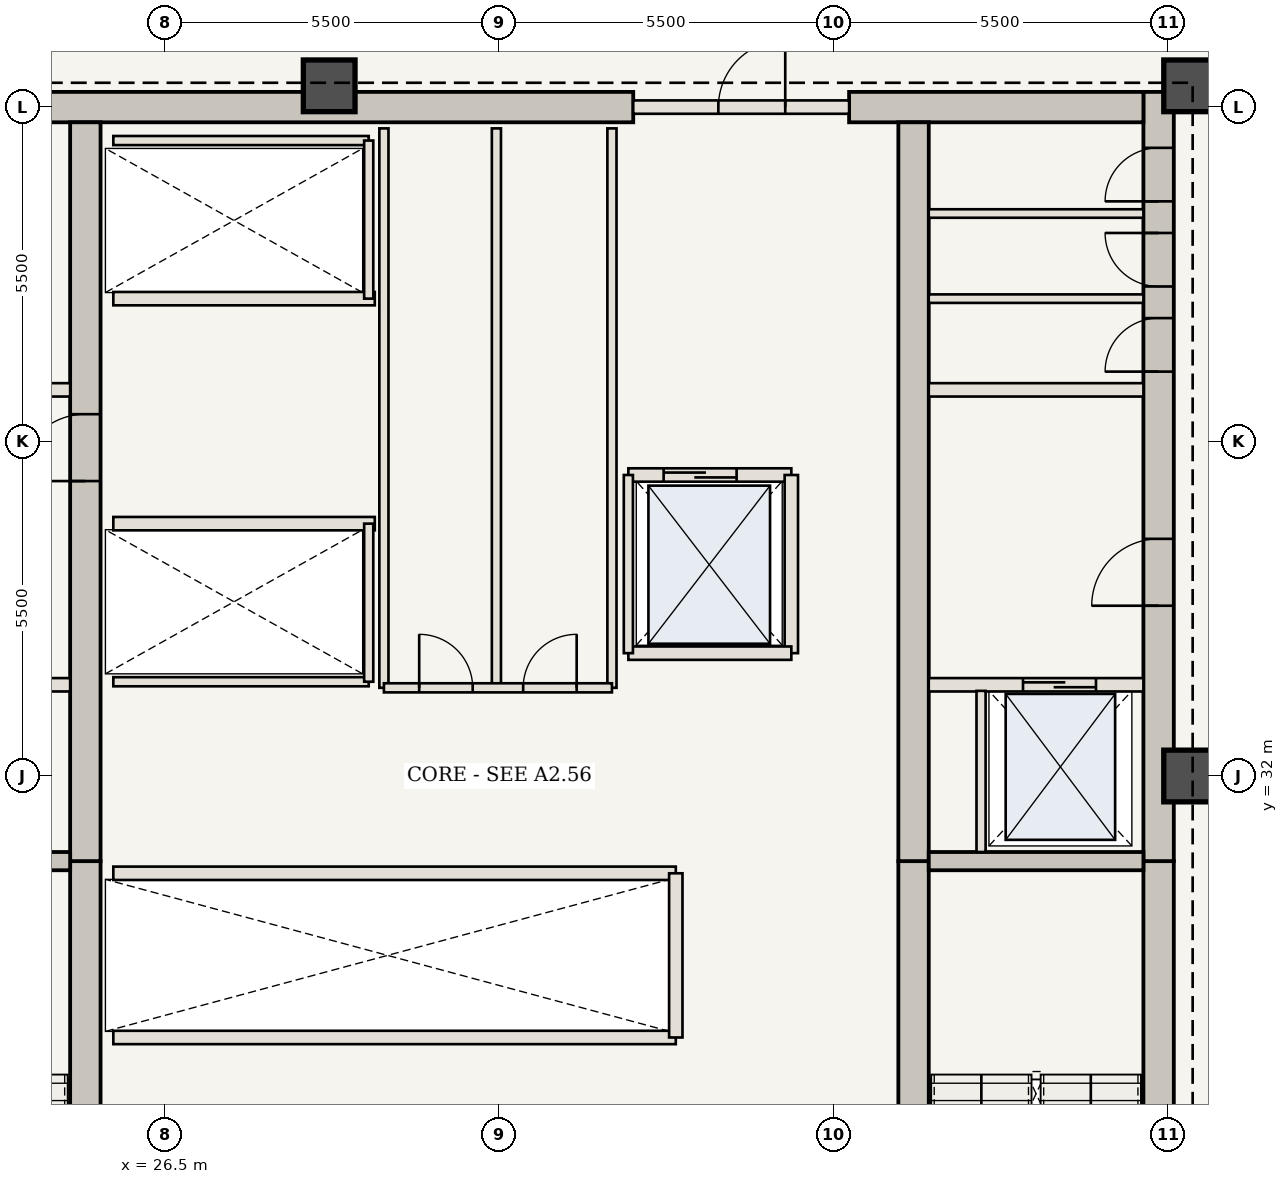
"""IFC4 building model, lengths in metres.
Left out: names, types, materials, properties, quantities, classifications, styles, units other than length and angle.
Written with IfcOpenShell. Run it as: python <this file> out.ifc"""

import sys

from ifc_helpers import new_model, si_unit, direction, frame, frame_2d, origin, origin_2d, place, context, subcontext, project, spatial, rectangle, extrude, element, fill, save


model = new_model("IFC4")
c1 = context("Model", 3, precision=1e-05, world=origin(), true_north=direction((0.0, 1.0)))
c2 = subcontext(c1, "Body", "Model", "MODEL_VIEW")
j1 = project(units=[si_unit("LENGTHUNIT", "METRE"), si_unit("PLANEANGLEUNIT", "RADIAN")], contexts=[c1])
p1 = place(None, origin())
s1 = spatial("IfcSite", under=j1, at=p1, CompositionType="ELEMENT")
p2 = place(p1, origin())
s2 = spatial("IfcBuilding", under=s1, at=p2, CompositionType="ELEMENT")
p3 = place(p2, frame((0.0, 0.0, 252.35)))
s3 = spatial("IfcBuildingStorey", under=s2, at=p3, CompositionType="ELEMENT", Elevation=252.35)
p4 = place(p3, frame((42.84, 20.7, 0.0), z_axis=(0.0, 0.0, 1.0), x_axis=(0.0, 1.0, 0.0)))
e1 = element("IfcWall", 1, at=p4, inside=s3, PredefinedType="SHEAR", context=c2, shape_type="SweptSolid", body=[
    extrude(rectangle(XDim=9.9, YDim=0.5, at=frame_2d((4.95, 0.0))), origin(), (0.0, 0.0, 1.0), 5.25),
])
p5 = place(p4, frame((1.05, 0.0, 0.0)))
e2 = element("IfcOpeningElement", 2, at=p5, cuts=e1, PredefinedType="OPENING", context=c2, shape_type="SweptSolid", body=[
    extrude(rectangle(XDim=1.15, YDim=2.15, at=frame_2d((0.575, 1.075))), frame((0.0, 0.26, 0.0), z_axis=(0.0, -1.0, 0.0), x_axis=(1.0, 0.0, 0.0)), (0.0, 0.0, 1.0), 0.52),
])
p6 = place(p3, frame((42.84, 30.6, 0.0), z_axis=(0.0, 0.0, 1.0), x_axis=(0.0, 1.0, 0.0)))
e3 = element("IfcWall", 3, at=p6, inside=s3, PredefinedType="SHEAR", context=c2, shape_type="SweptSolid", body=[
    extrude(rectangle(XDim=12.65, YDim=0.5, at=frame_2d((6.325, 0.0))), origin(), (0.0, 0.0, 1.0), 5.25),
])
p7 = place(p6, frame((4.2, 0.0, 0.0)))
e4 = element("IfcOpeningElement", 4, at=p7, cuts=e3, PredefinedType="OPENING", context=c2, shape_type="SweptSolid", body=[
    extrude(rectangle(XDim=1.1, YDim=2.15, at=frame_2d((0.55, 1.075))), frame((0.0, 0.26, 0.0), z_axis=(0.0, -1.0, 0.0), x_axis=(1.0, 0.0, 0.0)), (0.0, 0.0, 1.0), 0.52),
])
p8 = place(p6, frame((8.05, 0.0, 0.0)))
e5 = element("IfcOpeningElement", 5, at=p8, cuts=e3, PredefinedType="OPENING", context=c2, shape_type="SweptSolid", body=[
    extrude(rectangle(XDim=0.88, YDim=2.1, at=frame_2d((0.44, 1.05))), frame((0.0, 0.26, 0.0), z_axis=(0.0, -1.0, 0.0), x_axis=(1.0, 0.0, 0.0)), (0.0, 0.0, 1.0), 0.52),
])
p9 = place(p6, frame((9.45, 0.0, 0.0)))
e6 = element("IfcOpeningElement", 6, at=p9, cuts=e3, PredefinedType="OPENING", context=c2, shape_type="SweptSolid", body=[
    extrude(rectangle(XDim=0.88, YDim=2.1, at=frame_2d((0.44, 1.05))), frame((0.0, 0.26, 0.0), z_axis=(0.0, -1.0, 0.0), x_axis=(1.0, 0.0, 0.0)), (0.0, 0.0, 1.0), 0.52),
])
p10 = place(p6, frame((10.85, 0.0, 0.0)))
e7 = element("IfcOpeningElement", 7, at=p10, cuts=e3, PredefinedType="OPENING", context=c2, shape_type="SweptSolid", body=[
    extrude(rectangle(XDim=0.88, YDim=2.1, at=frame_2d((0.44, 1.05))), frame((0.0, 0.26, 0.0), z_axis=(0.0, -1.0, 0.0), x_axis=(1.0, 0.0, 0.0)), (0.0, 0.0, 1.0), 0.52),
])
p11 = place(p3, frame((21.41, 43.0, 0.0), z_axis=(0.0, 0.0, 1.0), x_axis=(1.0, 0.0, 0.0)))
e8 = element("IfcWall", 8, at=p11, inside=s3, PredefinedType="SHEAR", context=c2, shape_type="SweptSolid", body=[
    extrude(rectangle(XDim=12.79, YDim=0.5, at=frame_2d((6.395, 0.0))), origin(), (0.0, 0.0, 1.0), 5.25),
])
p12 = place(p3, frame((37.75, 43.0, 0.0), z_axis=(0.0, 0.0, 1.0), x_axis=(1.0, 0.0, 0.0)))
e9 = element("IfcWall", 9, at=p12, inside=s3, PredefinedType="SHEAR", context=c2, shape_type="SweptSolid", body=[
    extrude(rectangle(XDim=4.84, YDim=0.5, at=frame_2d((2.42, 0.0))), origin(), (0.0, 0.0, 1.0), 5.25),
])
p13 = place(p3, frame((25.19, 21.2, 0.0), z_axis=(0.0, 0.0, 1.0), x_axis=(0.0, 1.0, 0.0)))
e10 = element("IfcWall", 10, at=p13, inside=s3, PredefinedType="SHEAR", context=c2, shape_type="SweptSolid", body=[
    extrude(rectangle(XDim=9.4, YDim=0.5, at=frame_2d((4.7, 0.0))), origin(), (0.0, 0.0, 1.0), 5.25),
])
p14 = place(p3, frame((25.19, 30.6, 0.0), z_axis=(0.0, 0.0, 1.0), x_axis=(0.0, 1.0, 0.0)))
e11 = element("IfcWall", 11, at=p14, inside=s3, PredefinedType="SHEAR", context=c2, shape_type="SweptSolid", body=[
    extrude(rectangle(XDim=12.15, YDim=0.5, at=frame_2d((6.075, 0.0))), origin(), (0.0, 0.0, 1.0), 5.25),
])
p15 = place(p14, frame((6.25, 0.0, 0.0)))
e12 = element("IfcOpeningElement", 12, at=p15, cuts=e11, PredefinedType="OPENING", context=c2, shape_type="SweptSolid", body=[
    extrude(rectangle(XDim=1.1, YDim=2.15, at=frame_2d((0.55, 1.075))), frame((0.0, 0.26, 0.0), z_axis=(0.0, -1.0, 0.0), x_axis=(1.0, 0.0, 0.0)), (0.0, 0.0, 1.0), 0.52),
])
p16 = place(p3, frame((38.81, 21.2, 0.0), z_axis=(0.0, 0.0, 1.0), x_axis=(0.0, 1.0, 0.0)))
e13 = element("IfcWall", 13, at=p16, inside=s3, PredefinedType="SHEAR", context=c2, shape_type="SweptSolid", body=[
    extrude(rectangle(XDim=9.4, YDim=0.5, at=frame_2d((4.7, 0.0))), origin(), (0.0, 0.0, 1.0), 5.25),
])
p17 = place(p3, frame((38.81, 30.6, 0.0), z_axis=(0.0, 0.0, 1.0), x_axis=(0.0, 1.0, 0.0)))
e14 = element("IfcWall", 14, at=p17, inside=s3, PredefinedType="SHEAR", context=c2, shape_type="SweptSolid", body=[
    extrude(rectangle(XDim=12.15, YDim=0.5, at=frame_2d((6.075, 0.0))), origin(), (0.0, 0.0, 1.0), 5.25),
])
for number, where, z_axis, x_axis in (
    (15, (43.35, 32.0, 0.0), (0.0, 0.0, 1.0), (1.0, 0.0, 0.0)),
    (16, (43.35, 43.35, 0.0), (0.0, 0.0, 1.0), (1.0, 0.0, 0.0)),
    (17, (29.2, 43.35, 0.0), (0.0, 0.0, 1.0), (1.0, 0.0, 0.0)),
):
    element("IfcColumn", number, at=place(p3, frame(where, z_axis=z_axis, x_axis=x_axis)), inside=s3, PredefinedType="COLUMN", context=c2, shape_type="SweptSolid", body=[
        extrude(rectangle(XDim=0.85, YDim=0.85, at=origin_2d()), origin(), (0.0, 0.0, 1.0), 4.83),
    ])
for number, where, z_axis, x_axis in (
    (18, (21.41, 30.6, 0.0), (0.0, 0.0, 1.0), (1.0, 0.0, 0.0)),
    (19, (39.06, 30.6, 0.0), (0.0, 0.0, 1.0), (1.0, 0.0, 0.0)),
):
    element("IfcWall", number, at=place(p3, frame(where, z_axis=z_axis, x_axis=x_axis)), inside=s3, PredefinedType="SHEAR", context=c2, shape_type="SweptSolid", body=[
        extrude(rectangle(XDim=3.53, YDim=0.3, at=frame_2d((1.765, 0.0))), origin(), (0.0, 0.0, 1.0), 4.83),
    ])
p18 = place(p3, frame((21.41, 33.5, 0.0), z_axis=(0.0, 0.0, 1.0), x_axis=(1.0, 0.0, 0.0)))
e20 = element("IfcWall", 20, at=p18, inside=s3, PredefinedType="STANDARD", context=c2, shape_type="SweptSolid", body=[
    extrude(rectangle(XDim=3.53, YDim=0.22, at=frame_2d((1.765, 0.0))), origin(), (0.0, 0.0, 1.0), 4.83),
])
p19 = place(p18, frame((0.75, 0.0, 0.0)))
e21 = element("IfcOpeningElement", 21, at=p19, cuts=e20, PredefinedType="OPENING", context=c2, shape_type="SweptSolid", body=[
    extrude(rectangle(XDim=1.2, YDim=2.2, at=frame_2d((0.6, 1.1))), frame((0.0, 0.12, 0.0), z_axis=(0.0, -1.0, 0.0), x_axis=(1.0, 0.0, 0.0)), (0.0, 0.0, 1.0), 0.24),
])
p20 = place(p3, frame((39.06, 33.5, 0.0), z_axis=(0.0, 0.0, 1.0), x_axis=(1.0, 0.0, 0.0)))
e22 = element("IfcWall", 22, at=p20, inside=s3, PredefinedType="STANDARD", context=c2, shape_type="SweptSolid", body=[
    extrude(rectangle(XDim=3.53, YDim=0.22, at=frame_2d((1.765, 0.0))), origin(), (0.0, 0.0, 1.0), 4.83),
])
p21 = place(p20, frame((1.55, 0.0, 0.0)))
e23 = element("IfcOpeningElement", 23, at=p21, cuts=e22, PredefinedType="OPENING", context=c2, shape_type="SweptSolid", body=[
    extrude(rectangle(XDim=1.2, YDim=2.2, at=frame_2d((0.6, 1.1))), frame((0.0, 0.12, 0.0), z_axis=(0.0, -1.0, 0.0), x_axis=(1.0, 0.0, 0.0)), (0.0, 0.0, 1.0), 0.24),
])
p22 = place(p3, frame((39.92, 30.75, 0.0), z_axis=(0.0, 0.0, 1.0), x_axis=(0.0, 1.0, 0.0)))
e24 = element("IfcWall", 24, at=p22, inside=s3, PredefinedType="STANDARD", context=c2, shape_type="SweptSolid", body=[
    extrude(rectangle(XDim=2.65, YDim=0.15, at=frame_2d((1.325, 0.0))), origin(), (0.0, 0.0, 1.0), 4.83),
])
for number, where, z_axis, x_axis in (
    (25, (21.41, 38.35, 0.0), (0.0, 0.0, 1.0), (1.0, 0.0, 0.0)),
    (26, (39.06, 38.35, 0.0), (0.0, 0.0, 1.0), (1.0, 0.0, 0.0)),
):
    element("IfcWall", number, at=place(p3, frame(where, z_axis=z_axis, x_axis=x_axis)), inside=s3, PredefinedType="STANDARD", context=c2, shape_type="SweptSolid", body=[
        extrude(rectangle(XDim=3.53, YDim=0.22, at=frame_2d((1.765, 0.0))), origin(), (0.0, 0.0, 1.0), 4.83),
    ])
for number, where, z_axis, x_axis in (
    (27, (39.06, 39.85, 0.0), (0.0, 0.0, 1.0), (1.0, 0.0, 0.0)),
    (28, (39.06, 41.25, 0.0), (0.0, 0.0, 1.0), (1.0, 0.0, 0.0)),
):
    element("IfcWall", number, at=place(p3, frame(where, z_axis=z_axis, x_axis=x_axis)), inside=s3, PredefinedType="STANDARD", context=c2, shape_type="SweptSolid", body=[
        extrude(rectangle(XDim=3.53, YDim=0.14, at=frame_2d((1.765, 0.0))), origin(), (0.0, 0.0, 1.0), 4.83),
    ])
for number, where, z_axis, x_axis in (
    (29, (25.65, 27.7, 0.0), (0.0, 0.0, 1.0), (1.0, 0.0, 0.0)),
    (30, (25.65, 30.4, 0.0), (0.0, 0.0, 1.0), (1.0, 0.0, 0.0)),
):
    element("IfcWall", number, at=place(p3, frame(where, z_axis=z_axis, x_axis=x_axis)), inside=s3, PredefinedType="STANDARD", context=c2, shape_type="SweptSolid", body=[
        extrude(rectangle(XDim=9.25, YDim=0.22, at=frame_2d((4.625, 0.0))), origin(), (0.0, 0.0, 1.0), 4.83),
    ])
p23 = place(p3, frame((34.9, 27.7, 0.0), z_axis=(0.0, 0.0, 1.0), x_axis=(0.0, 1.0, 0.0)))
e31 = element("IfcWall", 31, at=p23, inside=s3, PredefinedType="STANDARD", context=c2, shape_type="SweptSolid", body=[
    extrude(rectangle(XDim=2.7, YDim=0.22, at=frame_2d((1.35, 0.0))), origin(), (0.0, 0.0, 1.0), 4.83),
])
p24 = place(p3, frame((25.65, 36.15, 0.0), z_axis=(0.0, 0.0, 1.0), x_axis=(1.0, 0.0, 0.0)))
e32 = element("IfcWall", 32, at=p24, inside=s3, PredefinedType="STANDARD", context=c2, shape_type="SweptSolid", body=[
    extrude(rectangle(XDim=4.3, YDim=0.22, at=frame_2d((2.15, 0.0))), origin(), (0.0, 0.0, 1.0), 4.83),
])
p25 = place(p3, frame((25.65, 33.55, 0.0), z_axis=(0.0, 0.0, 1.0), x_axis=(1.0, 0.0, 0.0)))
e33 = element("IfcWall", 33, at=p25, inside=s3, PredefinedType="STANDARD", context=c2, shape_type="SweptSolid", body=[
    extrude(rectangle(XDim=4.2, YDim=0.15, at=frame_2d((2.1, 0.0))), origin(), (0.0, 0.0, 1.0), 4.83),
])
p26 = place(p3, frame((29.85, 33.55, 0.0), z_axis=(0.0, 0.0, 1.0), x_axis=(0.0, 1.0, 0.0)))
e34 = element("IfcWall", 34, at=p26, inside=s3, PredefinedType="STANDARD", context=c2, shape_type="SweptSolid", body=[
    extrude(rectangle(XDim=2.6, YDim=0.15, at=frame_2d((1.3, 0.0))), origin(), (0.0, 0.0, 1.0), 4.83),
])
p27 = place(p3, frame((25.65, 39.85, 0.0), z_axis=(0.0, 0.0, 1.0), x_axis=(1.0, 0.0, 0.0)))
e35 = element("IfcWall", 35, at=p27, inside=s3, PredefinedType="STANDARD", context=c2, shape_type="SweptSolid", body=[
    extrude(rectangle(XDim=4.3, YDim=0.22, at=frame_2d((2.15, 0.0))), origin(), (0.0, 0.0, 1.0), 4.83),
])
p28 = place(p3, frame((25.65, 42.45, 0.0), z_axis=(0.0, 0.0, 1.0), x_axis=(1.0, 0.0, 0.0)))
e36 = element("IfcWall", 36, at=p28, inside=s3, PredefinedType="STANDARD", context=c2, shape_type="SweptSolid", body=[
    extrude(rectangle(XDim=4.2, YDim=0.15, at=frame_2d((2.1, 0.0))), origin(), (0.0, 0.0, 1.0), 4.83),
])
p29 = place(p3, frame((29.85, 39.85, 0.0), z_axis=(0.0, 0.0, 1.0), x_axis=(0.0, 1.0, 0.0)))
e37 = element("IfcWall", 37, at=p29, inside=s3, PredefinedType="STANDARD", context=c2, shape_type="SweptSolid", body=[
    extrude(rectangle(XDim=2.6, YDim=0.15, at=frame_2d((1.3, 0.0))), origin(), (0.0, 0.0, 1.0), 4.83),
])
for number, where, z_axis, x_axis in (
    (38, (30.1, 33.45, 0.0), (0.0, 0.0, 1.0), (0.0, 1.0, 0.0)),
    (39, (31.95, 33.45, 0.0), (0.0, 0.0, 1.0), (0.0, 1.0, 0.0)),
    (40, (33.85, 33.45, 0.0), (0.0, 0.0, 1.0), (0.0, 1.0, 0.0)),
):
    element("IfcWall", number, at=place(p3, frame(where, z_axis=z_axis, x_axis=x_axis)), inside=s3, PredefinedType="STANDARD", context=c2, shape_type="SweptSolid", body=[
        extrude(rectangle(XDim=9.2, YDim=0.15, at=frame_2d((4.6, 0.0))), origin(), (0.0, 0.0, 1.0), 4.83),
    ])
p30 = place(p3, frame((30.1, 33.45, 0.0), z_axis=(0.0, 0.0, 1.0), x_axis=(1.0, 0.0, 0.0)))
e41 = element("IfcWall", 41, at=p30, inside=s3, PredefinedType="STANDARD", context=c2, shape_type="SweptSolid", body=[
    extrude(rectangle(XDim=3.75, YDim=0.15, at=frame_2d((1.875, 0.0))), origin(), (0.0, 0.0, 1.0), 4.83),
])
p31 = place(p30, frame((0.58, 0.0, 0.0)))
e42 = element("IfcOpeningElement", 42, at=p31, cuts=e41, PredefinedType="OPENING", context=c2, shape_type="SweptSolid", body=[
    extrude(rectangle(XDim=0.88, YDim=2.1, at=frame_2d((0.44, 1.05))), frame((0.0, 0.085, 0.0), z_axis=(0.0, -1.0, 0.0), x_axis=(1.0, 0.0, 0.0)), (0.0, 0.0, 1.0), 0.17),
])
p32 = place(p30, frame((2.29, 0.0, 0.0)))
e43 = element("IfcOpeningElement", 43, at=p32, cuts=e41, PredefinedType="OPENING", context=c2, shape_type="SweptSolid", body=[
    extrude(rectangle(XDim=0.88, YDim=2.1, at=frame_2d((0.44, 1.05))), frame((0.0, 0.085, 0.0), z_axis=(0.0, -1.0, 0.0), x_axis=(1.0, 0.0, 0.0)), (0.0, 0.0, 1.0), 0.17),
])
p33 = place(p3, frame((34.2, 43.0, 0.0), z_axis=(0.0, 0.0, 1.0), x_axis=(1.0, 0.0, 0.0)))
e44 = element("IfcWall", 44, at=p33, inside=s3, PredefinedType="STANDARD", context=c2, shape_type="SweptSolid", body=[
    extrude(rectangle(XDim=3.55, YDim=0.22, at=frame_2d((1.775, 0.0))), origin(), (0.0, 0.0, 1.0), 4.83),
])
p34 = place(p33, frame((1.4, 0.0, 0.0)))
e45 = element("IfcOpeningElement", 45, at=p34, cuts=e44, PredefinedType="OPENING", context=c2, shape_type="SweptSolid", body=[
    extrude(rectangle(XDim=1.1, YDim=2.15, at=frame_2d((0.55, 1.075))), frame((0.0, 0.12, 0.0), z_axis=(0.0, -1.0, 0.0), x_axis=(1.0, 0.0, 0.0)), (0.0, 0.0, 1.0), 0.24),
])
p35 = place(p3, frame((34.12, 36.95, 0.0), z_axis=(0.0, 0.0, 1.0), x_axis=(1.0, 0.0, 0.0)))
e46 = element("IfcWall", 46, at=p35, inside=s3, PredefinedType="STANDARD", context=c2, shape_type="SweptSolid", body=[
    extrude(rectangle(XDim=2.68, YDim=0.22, at=frame_2d((1.34, 0.0))), origin(), (0.0, 0.0, 1.0), 4.83),
])
p36 = place(p35, frame((0.58, 0.0, 0.0)))
e47 = element("IfcOpeningElement", 47, at=p36, cuts=e46, PredefinedType="OPENING", context=c2, shape_type="SweptSolid", body=[
    extrude(rectangle(XDim=1.2, YDim=2.2, at=frame_2d((0.6, 1.1))), frame((0.0, 0.12, 0.0), z_axis=(0.0, -1.0, 0.0), x_axis=(1.0, 0.0, 0.0)), (0.0, 0.0, 1.0), 0.24),
])
p37 = place(p3, frame((36.8, 34.02, 0.0), z_axis=(0.0, 0.0, 1.0), x_axis=(0.0, 1.0, 0.0)))
e48 = element("IfcWall", 48, at=p37, inside=s3, PredefinedType="STANDARD", context=c2, shape_type="SweptSolid", body=[
    extrude(rectangle(XDim=2.93, YDim=0.22, at=frame_2d((1.465, 0.0))), origin(), (0.0, 0.0, 1.0), 4.83),
])
p38 = place(p3, frame((34.12, 34.02, 0.0), z_axis=(0.0, 0.0, 1.0), x_axis=(1.0, 0.0, 0.0)))
e49 = element("IfcWall", 49, at=p38, inside=s3, PredefinedType="STANDARD", context=c2, shape_type="SweptSolid", body=[
    extrude(rectangle(XDim=2.68, YDim=0.22, at=frame_2d((1.34, 0.0))), origin(), (0.0, 0.0, 1.0), 4.83),
])
p39 = place(p3, frame((34.12, 34.02, 0.0), z_axis=(0.0, 0.0, 1.0), x_axis=(0.0, 1.0, 0.0)))
e50 = element("IfcWall", 50, at=p39, inside=s3, PredefinedType="STANDARD", context=c2, shape_type="SweptSolid", body=[
    extrude(rectangle(XDim=2.93, YDim=0.15, at=frame_2d((1.465, 0.0))), origin(), (0.0, 0.0, 1.0), 4.83),
])
p40 = place(p7, origin())
e51 = element("IfcDoor", 51, at=p40, inside=s3, OperationType="SINGLE_SWING_LEFT", PredefinedType="DOOR", context=c2, shape_type="SweptSolid", body=[
    extrude(rectangle(XDim=1.1, YDim=2.15, at=frame_2d((0.55, 1.075))), frame((0.0, 0.025, 0.0), z_axis=(0.0, -1.0, 0.0), x_axis=(1.0, 0.0, 0.0)), (0.0, 0.0, 1.0), 0.05),
])
fill(e4, e51)
p41 = place(p15, origin())
e52 = element("IfcDoor", 52, at=p41, inside=s3, OperationType="SINGLE_SWING_LEFT", PredefinedType="DOOR", context=c2, shape_type="SweptSolid", body=[
    extrude(rectangle(XDim=1.1, YDim=2.15, at=frame_2d((0.55, 1.075))), frame((0.0, 0.025, 0.0), z_axis=(0.0, -1.0, 0.0), x_axis=(1.0, 0.0, 0.0)), (0.0, 0.0, 1.0), 0.05),
])
fill(e12, e52)
p42 = place(p8, origin())
e53 = element("IfcDoor", 53, at=p42, inside=s3, OperationType="SINGLE_SWING_LEFT", PredefinedType="DOOR", context=c2, shape_type="SweptSolid", body=[
    extrude(rectangle(XDim=0.88, YDim=2.1, at=frame_2d((0.44, 1.05))), frame((0.0, 0.025, 0.0), z_axis=(0.0, -1.0, 0.0), x_axis=(1.0, 0.0, 0.0)), (0.0, 0.0, 1.0), 0.05),
])
fill(e5, e53)
p43 = place(p9, origin())
e54 = element("IfcDoor", 54, at=p43, inside=s3, OperationType="SINGLE_SWING_RIGHT", PredefinedType="DOOR", context=c2, shape_type="SweptSolid", body=[
    extrude(rectangle(XDim=0.88, YDim=2.1, at=frame_2d((0.44, 1.05))), frame((0.0, 0.025, 0.0), z_axis=(0.0, -1.0, 0.0), x_axis=(1.0, 0.0, 0.0)), (0.0, 0.0, 1.0), 0.05),
])
fill(e6, e54)
p44 = place(p10, origin())
e55 = element("IfcDoor", 55, at=p44, inside=s3, OperationType="SINGLE_SWING_LEFT", PredefinedType="DOOR", context=c2, shape_type="SweptSolid", body=[
    extrude(rectangle(XDim=0.88, YDim=2.1, at=frame_2d((0.44, 1.05))), frame((0.0, 0.025, 0.0), z_axis=(0.0, -1.0, 0.0), x_axis=(1.0, 0.0, 0.0)), (0.0, 0.0, 1.0), 0.05),
])
fill(e7, e55)
p45 = place(p21, origin())
e56 = element("IfcDoor", 56, at=p45, inside=s3, OperationType="DOUBLE_DOOR_SLIDING", PredefinedType="DOOR", context=c2, shape_type="SweptSolid", body=[
    extrude(rectangle(XDim=1.2, YDim=2.2, at=frame_2d((0.6, 1.1))), frame((0.0, 0.025, 0.0), z_axis=(0.0, -1.0, 0.0), x_axis=(1.0, 0.0, 0.0)), (0.0, 0.0, 1.0), 0.05),
])
fill(e23, e56)
p46 = place(p31, origin())
e57 = element("IfcDoor", 57, at=p46, inside=s3, OperationType="SINGLE_SWING_LEFT", PredefinedType="DOOR", context=c2, shape_type="SweptSolid", body=[
    extrude(rectangle(XDim=0.88, YDim=2.1, at=frame_2d((0.44, 1.05))), frame((0.0, 0.025, 0.0), z_axis=(0.0, -1.0, 0.0), x_axis=(1.0, 0.0, 0.0)), (0.0, 0.0, 1.0), 0.05),
])
fill(e42, e57)
p47 = place(p32, origin())
e58 = element("IfcDoor", 58, at=p47, inside=s3, OperationType="SINGLE_SWING_RIGHT", PredefinedType="DOOR", context=c2, shape_type="SweptSolid", body=[
    extrude(rectangle(XDim=0.88, YDim=2.1, at=frame_2d((0.44, 1.05))), frame((0.0, 0.025, 0.0), z_axis=(0.0, -1.0, 0.0), x_axis=(1.0, 0.0, 0.0)), (0.0, 0.0, 1.0), 0.05),
])
fill(e43, e58)
p48 = place(p34, origin())
e59 = element("IfcDoor", 59, at=p48, inside=s3, OperationType="SINGLE_SWING_RIGHT", PredefinedType="DOOR", context=c2, shape_type="SweptSolid", body=[
    extrude(rectangle(XDim=1.1, YDim=2.15, at=frame_2d((0.55, 1.075))), frame((0.0, 0.025, 0.0), z_axis=(0.0, -1.0, 0.0), x_axis=(1.0, 0.0, 0.0)), (0.0, 0.0, 1.0), 0.05),
])
fill(e45, e59)
p49 = place(p36, origin())
e60 = element("IfcDoor", 60, at=p49, inside=s3, OperationType="DOUBLE_DOOR_SLIDING", PredefinedType="DOOR", context=c2, shape_type="SweptSolid", body=[
    extrude(rectangle(XDim=1.2, YDim=2.2, at=frame_2d((0.6, 1.1))), frame((0.0, 0.025, 0.0), z_axis=(0.0, -1.0, 0.0), x_axis=(1.0, 0.0, 0.0)), (0.0, 0.0, 1.0), 0.05),
])
fill(e47, e60)
save(model, sys.argv[1])
